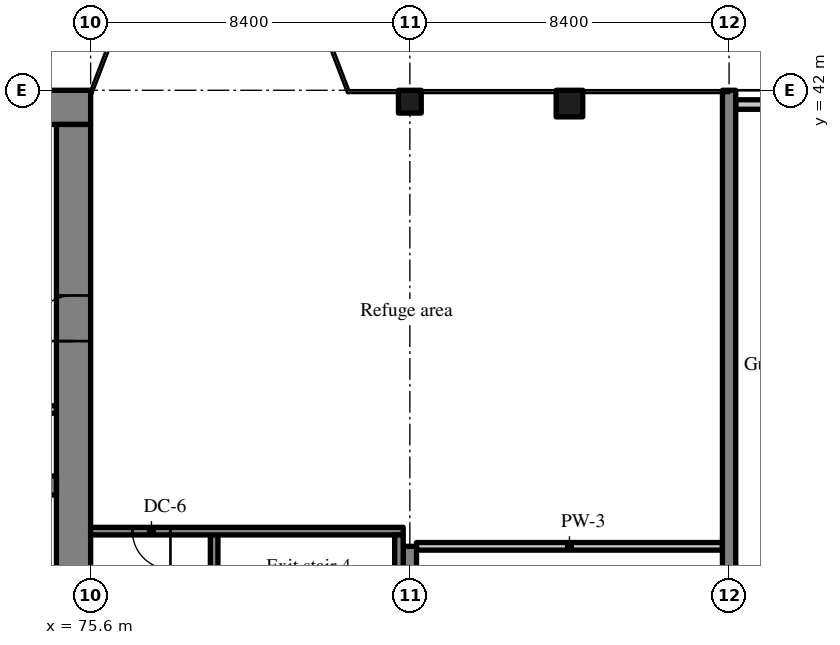
"""IFC4 building model, lengths in metres.
Left out: names, types, materials, properties, quantities, classifications, styles, units other than length and angle.
Written with IfcOpenShell. Run it as: python <this file> out.ifc"""

import sys

from ifc_helpers import new_model, si_unit, direction, frame, frame_2d, origin, origin_2d, place, context, subcontext, project, spatial, rectangle, extrude, source, transform, mapped, element, fill, save


model = new_model("IFC4")
c1 = context("Model", 3, precision=1e-05, world=origin(), true_north=direction((0.0, 1.0)))
c2 = subcontext(c1, "Body", "Model", "MODEL_VIEW")
j1 = project(units=[si_unit("LENGTHUNIT", "METRE"), si_unit("PLANEANGLEUNIT", "RADIAN")], contexts=[c1])
p1 = place(None, origin())
s1 = spatial("IfcSite", under=j1, at=p1, CompositionType="ELEMENT")
p2 = place(p1, origin())
s2 = spatial("IfcBuilding", under=s1, at=p2, CompositionType="ELEMENT")
p3 = place(p2, frame((0.0, 0.0, 106.6)))
s3 = spatial("IfcBuildingStorey", under=s2, at=p3, CompositionType="ELEMENT", Elevation=106.6)
m1 = source(origin(), c2, "Body", "SweptSolid", [
    extrude(rectangle(XDim=50.4, YDim=0.9, at=frame_2d((25.2, 0.0))), origin(), (0.0, 0.0, 1.0), 3.52),
])
p4 = place(p3, frame((25.2, 41.55, 0.0), z_axis=(0.0, 0.0, 1.0), x_axis=(1.0, 0.0, 0.0)))
e1 = element("IfcWall", 1, at=p4, inside=s3, PredefinedType="SHEAR", context=c2, shape_type="MappedRepresentation", body=[
    mapped(m1, transform((0.0, 0.0, 0.0), scale=1.0)),
])
m2 = source(origin(), c2, "Body", "SweptSolid", [
    extrude(rectangle(XDim=18.2, YDim=0.9, at=frame_2d((9.1, 0.0))), origin(), (0.0, 0.0, 1.0), 3.52),
])
p5 = place(p3, frame((75.15, 22.9, 0.0), z_axis=(0.0, 0.0, 1.0), x_axis=(0.0, 1.0, 0.0)))
e2 = element("IfcWall", 2, at=p5, inside=s3, PredefinedType="SHEAR", context=c2, shape_type="MappedRepresentation", body=[
    mapped(m2, transform((0.0, 0.0, 0.0), scale=1.0)),
])
m3 = source(origin(), c2, "Body", "SweptSolid", [
    extrude(rectangle(XDim=1.0, YDim=2.1, at=frame_2d((0.5, 1.05))), frame((0.0, 0.46, 0.0), z_axis=(0.0, -1.0, 0.0), x_axis=(1.0, 0.0, 0.0)), (0.0, 0.0, 1.0), 0.92),
])
p6 = place(p5, frame((2.6, 0.0, 0.0)))
e3 = element("IfcOpeningElement", 3, at=p6, cuts=e2, PredefinedType="OPENING", context=c2, shape_type="MappedRepresentation", body=[
    mapped(m3, transform((0.0, 0.0, 0.0), scale=1.0)),
])
m4 = source(origin(), c2, "Body", "SweptSolid", [
    extrude(rectangle(XDim=1.2, YDim=2.1, at=frame_2d((0.6, 1.05))), frame((0.0, 0.46, 0.0), z_axis=(0.0, -1.0, 0.0), x_axis=(1.0, 0.0, 0.0)), (0.0, 0.0, 1.0), 0.92),
])
p7 = place(p5, frame((12.5, 0.0, 0.0)))
e4 = element("IfcOpeningElement", 4, at=p7, cuts=e2, PredefinedType="OPENING", context=c2, shape_type="MappedRepresentation", body=[
    mapped(m4, transform((0.0, 0.0, 0.0), scale=1.0)),
])
m5 = source(origin(), c2, "Body", "SweptSolid", [
    extrude(rectangle(XDim=7.25, YDim=0.5, at=frame_2d((3.625, 0.0))), origin(), (0.0, 0.0, 1.0), 3.52),
])
p8 = place(p3, frame((67.45, 31.6, 0.0), z_axis=(0.0, 0.0, 1.0), x_axis=(1.0, 0.0, 0.0)))
e5 = element("IfcWall", 5, at=p8, inside=s3, PredefinedType="SHEAR", context=c2, shape_type="MappedRepresentation", body=[
    mapped(m5, transform((0.0, 0.0, 0.0), scale=1.0)),
])
m6 = source(origin(), c2, "Body", "SweptSolid", [
    extrude(rectangle(XDim=1.1, YDim=2.1, at=frame_2d((0.55, 1.05))), frame((0.0, 0.26, 0.0), z_axis=(0.0, -1.0, 0.0), x_axis=(1.0, 0.0, 0.0)), (0.0, 0.0, 1.0), 0.52),
])
p9 = place(p8, frame((5.575, 0.0, 0.0)))
e6 = element("IfcOpeningElement", 6, at=p9, cuts=e5, PredefinedType="OPENING", context=c2, shape_type="MappedRepresentation", body=[
    mapped(m6, transform((0.0, 0.0, 0.0), scale=1.0)),
])
m7 = source(origin(), c2, "Body", "SweptSolid", [
    extrude(rectangle(XDim=8.0, YDim=0.35, at=frame_2d((4.0, 0.0))), origin(), (0.0, 0.0, 1.0), 3.52),
])
p10 = place(p3, frame((84.0, 22.0, 0.0), z_axis=(0.0, 0.0, 1.0), x_axis=(0.0, 1.0, 0.0)))
e7 = element("IfcWall", 7, at=p10, inside=s3, PredefinedType="SHEAR", context=c2, shape_type="MappedRepresentation", body=[
    mapped(m7, transform((0.0, 0.0, 0.0), scale=1.0)),
])
m8 = source(origin(), c2, "Body", "SweptSolid", [
    extrude(rectangle(XDim=20.0, YDim=0.35, at=frame_2d((10.0, 0.0))), origin(), (0.0, 0.0, 1.0), 3.52),
])
p11 = place(p3, frame((92.4, 22.0, 0.0), z_axis=(0.0, 0.0, 1.0), x_axis=(0.0, 1.0, 0.0)))
e8 = element("IfcWall", 8, at=p11, inside=s3, PredefinedType="SHEAR", context=c2, shape_type="MappedRepresentation", body=[
    mapped(m8, transform((0.0, 0.0, 0.0), scale=1.0)),
])
m9 = source(origin(), c2, "Body", "SweptSolid", [
    extrude(rectangle(XDim=0.6, YDim=0.6, at=origin_2d()), origin(), (0.0, 0.0, 1.0), 3.52),
])
p12 = place(p3, frame((84.0, 41.7, 0.0), z_axis=(0.0, 0.0, 1.0), x_axis=(1.0, 0.0, 0.0)))
e9 = element("IfcColumn", 9, at=p12, inside=s3, PredefinedType="COLUMN", context=c2, shape_type="MappedRepresentation", body=[
    mapped(m9, transform((0.0, 0.0, 0.0), scale=1.0)),
])
m10 = source(origin(), c2, "Body", "SweptSolid", [
    extrude(rectangle(XDim=0.7, YDim=0.7, at=origin_2d()), origin(), (0.0, 0.0, 1.0), 3.52),
])
p13 = place(p3, frame((88.2, 41.65, 0.0), z_axis=(0.0, 0.0, 1.0), x_axis=(1.0, 0.0, 0.0)))
e10 = element("IfcColumn", 10, at=p13, inside=s3, PredefinedType="COLUMN", context=c2, shape_type="MappedRepresentation", body=[
    mapped(m10, transform((0.0, 0.0, 0.0), scale=1.0)),
])
m11 = source(origin(), c2, "Body", "SweptSolid", [
    extrude(rectangle(XDim=4.07, YDim=0.25, at=frame_2d((2.035, 0.0))), origin(), (0.0, 0.0, 1.0), 2.82),
])
p14 = place(p3, frame((96.645, 41.625, 0.0), z_axis=(0.0, 0.0, 1.0), x_axis=(-1.0, 0.0, 0.0)))
e11 = element("IfcWall", 11, at=p14, inside=s3, PredefinedType="SOLIDWALL", context=c2, shape_type="MappedRepresentation", body=[
    mapped(m11, transform((0.0, 0.0, 0.0), scale=1.0)),
])
m12 = source(origin(), c2, "Body", "SweptSolid", [
    extrude(rectangle(XDim=1.5, YDim=1.5, at=frame_2d((0.75, 0.75))), frame((0.0, 0.135, 0.0), z_axis=(0.0, -1.0, 0.0), x_axis=(1.0, 0.0, 0.0)), (0.0, 0.0, 1.0), 0.27),
])
p15 = place(p14, frame((1.285, 0.0, 0.9)))
e12 = element("IfcOpeningElement", 12, at=p15, cuts=e11, PredefinedType="OPENING", context=c2, shape_type="MappedRepresentation", body=[
    mapped(m12, transform((0.0, 0.0, 0.0), scale=1.0)),
])
m13 = source(origin(), c2, "Body", "SweptSolid", [
    extrude(rectangle(XDim=2.25, YDim=0.2, at=frame_2d((1.125, 0.0))), origin(), (0.0, 0.0, 1.0), 3.52),
])
p16 = place(p3, frame((72.45, 33.6, 0.0), z_axis=(0.0, 0.0, 1.0), x_axis=(1.0, 0.0, 0.0)))
e13 = element("IfcWall", 13, at=p16, inside=s3, PredefinedType="SOLIDWALL", context=c2, shape_type="MappedRepresentation", body=[
    mapped(m13, transform((0.0, 0.0, 0.0), scale=1.0)),
])
m14 = source(origin(), c2, "Body", "SweptSolid", [
    extrude(rectangle(XDim=8.3, YDim=0.2, at=frame_2d((4.15, 0.0))), origin(), (0.0, 0.0, 1.0), 3.52),
])
p17 = place(p3, frame((78.85, 22.1, 0.0), z_axis=(0.0, 0.0, 1.0), x_axis=(0.0, 1.0, 0.0)))
e14 = element("IfcWall", 14, at=p17, inside=s3, PredefinedType="SOLIDWALL", context=c2, shape_type="MappedRepresentation", body=[
    mapped(m14, transform((0.0, 0.0, 0.0), scale=1.0)),
])
m15 = source(origin(), c2, "Body", "SweptSolid", [
    extrude(rectangle(XDim=1.2, YDim=2.1, at=frame_2d((0.6, 1.05))), frame((0.0, 0.11, 0.0), z_axis=(0.0, -1.0, 0.0), x_axis=(1.0, 0.0, 0.0)), (0.0, 0.0, 1.0), 0.22),
])
p18 = place(p17, frame((0.6, 0.0, 0.0)))
e15 = element("IfcOpeningElement", 15, at=p18, cuts=e14, PredefinedType="OPENING", context=c2, shape_type="MappedRepresentation", body=[
    mapped(m15, transform((0.0, 0.0, 0.0), scale=1.0)),
])
m16 = source(origin(), c2, "Body", "SweptSolid", [
    extrude(rectangle(XDim=8.225, YDim=0.2, at=frame_2d((4.112, 0.0))), origin(), (0.0, 0.0, 1.0), 3.52),
])
p19 = place(p3, frame((83.825, 30.4, 0.0), z_axis=(0.0, 0.0, 1.0), x_axis=(-1.0, 0.0, 0.0)))
e16 = element("IfcWall", 16, at=p19, inside=s3, PredefinedType="SOLIDWALL", context=c2, shape_type="MappedRepresentation", body=[
    mapped(m16, transform((0.0, 0.0, 0.0), scale=1.0)),
])
m17 = source(origin(), c2, "Body", "SweptSolid", [
    extrude(rectangle(XDim=1.0, YDim=2.1, at=frame_2d((0.5, 1.05))), frame((0.0, 0.11, 0.0), z_axis=(0.0, -1.0, 0.0), x_axis=(1.0, 0.0, 0.0)), (0.0, 0.0, 1.0), 0.22),
])
p20 = place(p19, frame((6.125, 0.0, 0.0)))
e17 = element("IfcOpeningElement", 17, at=p20, cuts=e16, PredefinedType="OPENING", context=c2, shape_type="MappedRepresentation", body=[
    mapped(m17, transform((0.0, 0.0, 0.0), scale=1.0)),
])
m18 = source(origin(), c2, "Body", "SweptSolid", [
    extrude(rectangle(XDim=8.1, YDim=0.225, at=frame_2d((4.05, 0.0))), origin(), (0.0, 0.0, 1.0), 3.52),
])
p21 = place(p3, frame((83.713, 22.2, 0.0), z_axis=(0.0, 0.0, 1.0), x_axis=(0.0, 1.0, 0.0)))
e18 = element("IfcWall", 18, at=p21, inside=s3, PredefinedType="SOLIDWALL", context=c2, shape_type="MappedRepresentation", body=[
    mapped(m18, transform((0.0, 0.0, 0.0), scale=1.0)),
])
m19 = source(origin(), c2, "Body", "SweptSolid", [
    extrude(rectangle(XDim=8.05, YDim=0.2, at=frame_2d((4.025, 0.0))), origin(), (0.0, 0.0, 1.0), 3.52),
])
p22 = place(p3, frame((84.175, 30.0, 0.0), z_axis=(0.0, 0.0, 1.0), x_axis=(1.0, 0.0, 0.0)))
e19 = element("IfcWall", 19, at=p22, inside=s3, PredefinedType="PARTITIONING", context=c2, shape_type="MappedRepresentation", body=[
    mapped(m19, transform((0.0, 0.0, 0.0), scale=1.0)),
])
m20 = source(origin(), c2, "Body", "SweptSolid", [
    extrude(rectangle(XDim=1.2, YDim=2.1, at=frame_2d((0.6, 1.05))), frame((0.0, 0.025, 0.0), z_axis=(0.0, -1.0, 0.0), x_axis=(1.0, 0.0, 0.0)), (0.0, 0.0, 1.0), 0.05),
])
p23 = place(p7, origin())
e20 = element("IfcDoor", 20, at=p23, inside=s3, OperationType="SINGLE_SWING_LEFT", PredefinedType="DOOR", context=c2, shape_type="MappedRepresentation", body=[
    mapped(m20, transform((0.0, 0.0, 0.0), scale=1.0)),
])
fill(e4, e20)
m21 = source(origin(), c2, "Body", "SweptSolid", [
    extrude(rectangle(XDim=1.0, YDim=2.1, at=frame_2d((0.5, 1.05))), frame((0.0, 0.025, 0.0), z_axis=(0.0, -1.0, 0.0), x_axis=(1.0, 0.0, 0.0)), (0.0, 0.0, 1.0), 0.05),
])
p24 = place(p20, origin())
e21 = element("IfcDoor", 21, at=p24, inside=s3, OperationType="SINGLE_SWING_LEFT", PredefinedType="DOOR", context=c2, shape_type="MappedRepresentation", body=[
    mapped(m21, transform((0.0, 0.0, 0.0), scale=1.0)),
])
fill(e17, e21)
save(model, sys.argv[1])
